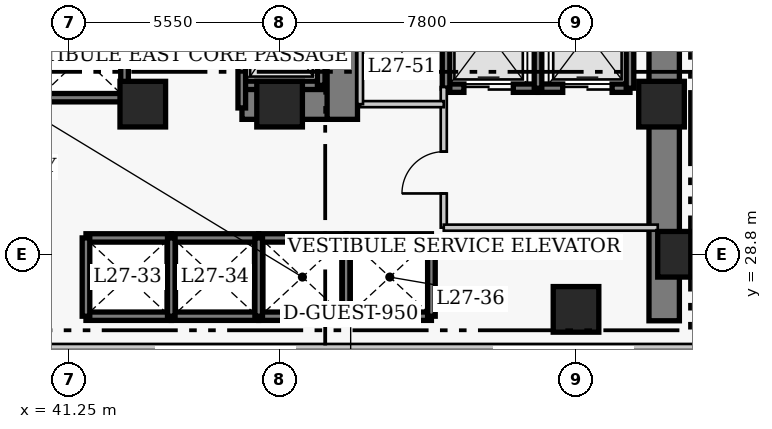
"""IFC4 building model, lengths in metres.
Left out: names, types, materials, properties, quantities, classifications, styles, units other than length and angle.
Written with IfcOpenShell. Run it as: python <this file> out.ifc"""

import sys

from ifc_helpers import new_model, si_unit, direction, frame, frame_2d, origin, origin_2d, place, context, subcontext, project, spatial, rectangle, extrude, element, fill, save


model = new_model("IFC4")
c1 = context("Model", 3, precision=1e-05, world=origin(), true_north=direction((0.0, 1.0)))
c2 = subcontext(c1, "Body", "Model", "MODEL_VIEW")
j1 = project(units=[si_unit("LENGTHUNIT", "METRE"), si_unit("PLANEANGLEUNIT", "RADIAN")], contexts=[c1])
p1 = place(None, origin())
s1 = spatial("IfcSite", under=j1, at=p1, CompositionType="ELEMENT")
p2 = place(p1, origin())
s2 = spatial("IfcBuilding", under=s1, at=p2, CompositionType="ELEMENT")
p3 = place(p2, frame((0.0, 0.0, 110.8)))
s3 = spatial("IfcBuildingStorey", under=s2, at=p3, CompositionType="ELEMENT", Elevation=110.8)
p4 = place(p3, frame((56.92, 27.05, 0.0), z_axis=(0.0, 0.0, 1.0), x_axis=(0.0, 1.0, 0.0)))
e1 = element("IfcWall", 1, at=p4, inside=s3, PredefinedType="SHEAR", context=c2, shape_type="SweptSolid", body=[
    extrude(rectangle(XDim=13.67, YDim=0.8, at=frame_2d((6.835, 0.0))), origin(), (0.0, 0.0, 1.0), 3.8),
])
p5 = place(p3, frame((45.81, 32.75, 0.0), z_axis=(0.0, 0.0, 1.0), x_axis=(1.0, 0.0, 0.0)))
e2 = element("IfcWall", 2, at=p5, inside=s3, PredefinedType="SHEAR", context=c2, shape_type="SweptSolid", body=[
    extrude(rectangle(XDim=2.64, YDim=0.8, at=frame_2d((1.32, 0.0))), origin(), (0.0, 0.0, 1.0), 3.8),
])
p6 = place(p3, frame((48.45, 32.35, 0.0), z_axis=(0.0, 0.0, 1.0), x_axis=(0.0, 1.0, 0.0)))
e3 = element("IfcWall", 3, at=p6, inside=s3, PredefinedType="SHEAR", context=c2, shape_type="SweptSolid", body=[
    extrude(rectangle(XDim=7.97, YDim=0.8, at=frame_2d((3.985, 0.0))), origin(), (0.0, 0.0, 1.0), 3.8),
])
p7 = place(p6, frame((5.85, 0.0, 0.0)))
e4 = element("IfcOpeningElement", 4, at=p7, cuts=e3, PredefinedType="OPENING", context=c2, shape_type="SweptSolid", body=[
    extrude(rectangle(XDim=1.1, YDim=2.15, at=frame_2d((0.55, 1.075))), frame((0.0, 0.41, 0.0), z_axis=(0.0, -1.0, 0.0), x_axis=(1.0, 0.0, 0.0)), (0.0, 0.0, 1.0), 0.82),
])
for number, where, z_axis, x_axis in (
    (5, (57.35, 28.8, 0.0), (0.0, 0.0, 1.0), (1.0, 0.0, 0.0)),
    (6, (43.2, 32.75, 0.0), (0.0, 0.0, 1.0), (1.0, 0.0, 0.0)),
    (7, (46.8, 32.75, 0.0), (0.0, 0.0, 1.0), (1.0, 0.0, 0.0)),
    (8, (54.6, 27.35, 0.0), (0.0, 0.0, 1.0), (1.0, 0.0, 0.0)),
    (9, (56.85, 32.75, 0.0), (0.0, 0.0, 1.0), (1.0, 0.0, 0.0)),
):
    element("IfcColumn", number, at=place(p3, frame(where, z_axis=z_axis, x_axis=x_axis)), inside=s3, PredefinedType="COLUMN", context=c2, shape_type="SweptSolid", body=[
        extrude(rectangle(XDim=1.2, YDim=1.2, at=origin_2d()), origin(), (0.0, 0.0, 1.0), 3.8),
    ])
for number, where, z_axis, x_axis in (
    (10, (41.705, 29.23, 0.0), (0.0, 0.0, 1.0), (1.0, 0.0, 0.0)),
    (11, (41.705, 27.17, 0.0), (0.0, 0.0, 1.0), (1.0, 0.0, 0.0)),
):
    element("IfcWall", number, at=place(p3, frame(where, z_axis=z_axis, x_axis=x_axis)), inside=s3, PredefinedType="SHEAR", context=c2, shape_type="SweptSolid", body=[
        extrude(rectangle(XDim=2.245, YDim=0.22, at=frame_2d((1.123, 0.0))), origin(), (0.0, 0.0, 1.0), 3.8),
    ])
p8 = place(p3, frame((41.705, 27.17, 0.0), z_axis=(0.0, 0.0, 1.0), x_axis=(0.0, 1.0, 0.0)))
e12 = element("IfcWall", 12, at=p8, inside=s3, PredefinedType="SHEAR", context=c2, shape_type="SweptSolid", body=[
    extrude(rectangle(XDim=2.06, YDim=0.2, at=frame_2d((1.03, 0.0))), origin(), (0.0, 0.0, 1.0), 3.8),
])
for number, where, z_axis, x_axis in (
    (13, (43.95, 29.23, 0.0), (0.0, 0.0, 1.0), (1.0, 0.0, 0.0)),
    (14, (43.95, 27.17, 0.0), (0.0, 0.0, 1.0), (1.0, 0.0, 0.0)),
):
    element("IfcWall", number, at=place(p3, frame(where, z_axis=z_axis, x_axis=x_axis)), inside=s3, PredefinedType="SHEAR", context=c2, shape_type="SweptSolid", body=[
        extrude(rectangle(XDim=2.3, YDim=0.22, at=frame_2d((1.15, 0.0))), origin(), (0.0, 0.0, 1.0), 3.8),
    ])
p9 = place(p3, frame((43.95, 27.17, 0.0), z_axis=(0.0, 0.0, 1.0), x_axis=(0.0, 1.0, 0.0)))
e15 = element("IfcWall", 15, at=p9, inside=s3, PredefinedType="SHEAR", context=c2, shape_type="SweptSolid", body=[
    extrude(rectangle(XDim=2.06, YDim=0.2, at=frame_2d((1.03, 0.0))), origin(), (0.0, 0.0, 1.0), 3.8),
])
for number, where, z_axis, x_axis in (
    (16, (46.25, 29.23, 0.0), (0.0, 0.0, 1.0), (1.0, 0.0, 0.0)),
    (17, (46.25, 27.17, 0.0), (0.0, 0.0, 1.0), (1.0, 0.0, 0.0)),
):
    element("IfcWall", number, at=place(p3, frame(where, z_axis=z_axis, x_axis=x_axis)), inside=s3, PredefinedType="SHEAR", context=c2, shape_type="SweptSolid", body=[
        extrude(rectangle(XDim=2.3, YDim=0.22, at=frame_2d((1.15, 0.0))), origin(), (0.0, 0.0, 1.0), 3.8),
    ])
p10 = place(p3, frame((46.25, 27.17, 0.0), z_axis=(0.0, 0.0, 1.0), x_axis=(0.0, 1.0, 0.0)))
e18 = element("IfcWall", 18, at=p10, inside=s3, PredefinedType="SHEAR", context=c2, shape_type="SweptSolid", body=[
    extrude(rectangle(XDim=2.06, YDim=0.2, at=frame_2d((1.03, 0.0))), origin(), (0.0, 0.0, 1.0), 3.8),
])
for number, where, z_axis, x_axis in (
    (19, (48.55, 29.23, 0.0), (0.0, 0.0, 1.0), (1.0, 0.0, 0.0)),
    (20, (48.55, 27.17, 0.0), (0.0, 0.0, 1.0), (1.0, 0.0, 0.0)),
):
    element("IfcWall", number, at=place(p3, frame(where, z_axis=z_axis, x_axis=x_axis)), inside=s3, PredefinedType="SHEAR", context=c2, shape_type="SweptSolid", body=[
        extrude(rectangle(XDim=2.245, YDim=0.22, at=frame_2d((1.123, 0.0))), origin(), (0.0, 0.0, 1.0), 3.8),
    ])
for number, where, z_axis, x_axis in (
    (21, (48.55, 27.17, 0.0), (0.0, 0.0, 1.0), (0.0, 1.0, 0.0)),
    (22, (50.795, 27.17, 0.0), (0.0, 0.0, 1.0), (0.0, 1.0, 0.0)),
):
    element("IfcWall", number, at=place(p3, frame(where, z_axis=z_axis, x_axis=x_axis)), inside=s3, PredefinedType="SHEAR", context=c2, shape_type="SweptSolid", body=[
        extrude(rectangle(XDim=2.06, YDim=0.2, at=frame_2d((1.03, 0.0))), origin(), (0.0, 0.0, 1.0), 3.8),
    ])
p11 = place(p3, frame((40.4, 32.92, 0.0), z_axis=(0.0, 0.0, 1.0), x_axis=(1.0, 0.0, 0.0)))
e23 = element("IfcWall", 23, at=p11, inside=s3, PredefinedType="SHEAR", context=c2, shape_type="SweptSolid", body=[
    extrude(rectangle(XDim=2.32, YDim=0.22, at=frame_2d((1.16, 0.0))), origin(), (0.0, 0.0, 1.0), 3.8),
])
p12 = place(p3, frame((42.72, 32.92, 0.0), z_axis=(0.0, 0.0, 1.0), x_axis=(0.0, 1.0, 0.0)))
e24 = element("IfcWall", 24, at=p12, inside=s3, PredefinedType="SHEAR", context=c2, shape_type="SweptSolid", body=[
    extrude(rectangle(XDim=2.16, YDim=0.2, at=frame_2d((1.08, 0.0))), origin(), (0.0, 0.0, 1.0), 3.8),
])
p13 = place(p3, frame((51.18, 33.17, 0.0), z_axis=(0.0, 0.0, 1.0), x_axis=(1.0, 0.0, 0.0)))
e25 = element("IfcWall", 25, at=p13, inside=s3, PredefinedType="SHEAR", context=c2, shape_type="SweptSolid", body=[
    extrude(rectangle(XDim=2.42, YDim=0.22, at=frame_2d((1.21, 0.0))), origin(), (0.0, 0.0, 1.0), 3.8),
])
p14 = place(p13, frame((0.47, 0.0, 0.0)))
e26 = element("IfcOpeningElement", 26, at=p14, cuts=e25, PredefinedType="OPENING", context=c2, shape_type="SweptSolid", body=[
    extrude(rectangle(XDim=1.3, YDim=2.15, at=frame_2d((0.65, 1.075))), frame((0.0, 0.12, 0.0), z_axis=(0.0, -1.0, 0.0), x_axis=(1.0, 0.0, 0.0)), (0.0, 0.0, 1.0), 0.24),
])
p15 = place(p3, frame((51.18, 33.17, 0.0), z_axis=(0.0, 0.0, 1.0), x_axis=(0.0, 1.0, 0.0)))
e27 = element("IfcWall", 27, at=p15, inside=s3, PredefinedType="SHEAR", context=c2, shape_type="SweptSolid", body=[
    extrude(rectangle(XDim=2.86, YDim=0.2, at=frame_2d((1.43, 0.0))), origin(), (0.0, 0.0, 1.0), 3.8),
])
p16 = place(p3, frame((53.6, 33.17, 0.0), z_axis=(0.0, 0.0, 1.0), x_axis=(1.0, 0.0, 0.0)))
e28 = element("IfcWall", 28, at=p16, inside=s3, PredefinedType="SHEAR", context=c2, shape_type="SweptSolid", body=[
    extrude(rectangle(XDim=2.42, YDim=0.22, at=frame_2d((1.21, 0.0))), origin(), (0.0, 0.0, 1.0), 3.8),
])
p17 = place(p16, frame((0.65, 0.0, 0.0)))
e29 = element("IfcOpeningElement", 29, at=p17, cuts=e28, PredefinedType="OPENING", context=c2, shape_type="SweptSolid", body=[
    extrude(rectangle(XDim=1.3, YDim=2.15, at=frame_2d((0.65, 1.075))), frame((0.0, 0.12, 0.0), z_axis=(0.0, -1.0, 0.0), x_axis=(1.0, 0.0, 0.0)), (0.0, 0.0, 1.0), 0.24),
])
for number, where, z_axis, x_axis in (
    (30, (53.6, 33.17, 0.0), (0.0, 0.0, 1.0), (0.0, 1.0, 0.0)),
    (31, (56.02, 33.17, 0.0), (0.0, 0.0, 1.0), (0.0, 1.0, 0.0)),
):
    element("IfcWall", number, at=place(p3, frame(where, z_axis=z_axis, x_axis=x_axis)), inside=s3, PredefinedType="SHEAR", context=c2, shape_type="SweptSolid", body=[
        extrude(rectangle(XDim=2.86, YDim=0.2, at=frame_2d((1.43, 0.0))), origin(), (0.0, 0.0, 1.0), 3.8),
    ])
p18 = place(p3, frame((45.805, 33.245, 0.0), z_axis=(0.0, 0.0, 1.0), x_axis=(1.0, 0.0, 0.0)))
e32 = element("IfcWall", 32, at=p18, inside=s3, PredefinedType="SHEAR", context=c2, shape_type="SweptSolid", body=[
    extrude(rectangle(XDim=2.09, YDim=0.22, at=frame_2d((1.045, 0.0))), origin(), (0.0, 0.0, 1.0), 3.8),
])
p19 = place(p3, frame((45.805, 32.65, 0.0), z_axis=(0.0, 0.0, 1.0), x_axis=(0.0, 1.0, 0.0)))
e33 = element("IfcWall", 33, at=p19, inside=s3, PredefinedType="SHEAR", context=c2, shape_type="SweptSolid", body=[
    extrude(rectangle(XDim=3.505, YDim=0.2, at=frame_2d((1.752, 0.0))), origin(), (0.0, 0.0, 1.0), 3.8),
])
p20 = place(p3, frame((47.895, 33.245, 0.0), z_axis=(0.0, 0.0, 1.0), x_axis=(0.0, 1.0, 0.0)))
e34 = element("IfcWall", 34, at=p20, inside=s3, PredefinedType="SHEAR", context=c2, shape_type="SweptSolid", body=[
    extrude(rectangle(XDim=2.91, YDim=0.2, at=frame_2d((1.455, 0.0))), origin(), (0.0, 0.0, 1.0), 3.8),
])
p21 = place(p3, frame((51.12, 29.5, 0.0), z_axis=(0.0, 0.0, 1.0), x_axis=(0.0, 1.0, 0.0)))
e35 = element("IfcWall", 35, at=p21, inside=s3, PredefinedType="PARTITIONING", context=c2, shape_type="SweptSolid", body=[
    extrude(rectangle(XDim=3.7, YDim=0.16, at=frame_2d((1.85, 0.0))), origin(), (0.0, 0.0, 1.0), 3.54),
])
p22 = place(p21, frame((0.9, 0.0, 0.0)))
e36 = element("IfcOpeningElement", 36, at=p22, cuts=e35, PredefinedType="OPENING", context=c2, shape_type="SweptSolid", body=[
    extrude(rectangle(XDim=1.1, YDim=2.15, at=frame_2d((0.55, 1.075))), frame((0.0, 0.09, 0.0), z_axis=(0.0, -1.0, 0.0), x_axis=(1.0, 0.0, 0.0)), (0.0, 0.0, 1.0), 0.18),
])
p23 = place(p3, frame((51.12, 29.5, 0.0), z_axis=(0.0, 0.0, 1.0), x_axis=(1.0, 0.0, 0.0)))
e37 = element("IfcWall", 37, at=p23, inside=s3, PredefinedType="PARTITIONING", context=c2, shape_type="SweptSolid", body=[
    extrude(rectangle(XDim=5.63, YDim=0.16, at=frame_2d((2.815, 0.0))), origin(), (0.0, 0.0, 1.0), 3.54),
])
p24 = place(p3, frame((48.92, 32.75, 0.0), z_axis=(0.0, 0.0, 1.0), x_axis=(1.0, 0.0, 0.0)))
e38 = element("IfcWall", 38, at=p24, inside=s3, PredefinedType="PARTITIONING", context=c2, shape_type="SweptSolid", body=[
    extrude(rectangle(XDim=2.2, YDim=0.16, at=frame_2d((1.1, 0.0))), origin(), (0.0, 0.0, 1.0), 3.54),
])
p25 = place(p3, frame((48.92, 32.75, 0.0), z_axis=(0.0, 0.0, 1.0), x_axis=(0.0, 1.0, 0.0)))
e39 = element("IfcWall", 39, at=p25, inside=s3, PredefinedType="PARTITIONING", context=c2, shape_type="SweptSolid", body=[
    extrude(rectangle(XDim=3.62, YDim=0.15, at=frame_2d((1.81, 0.0))), origin(), (0.0, 0.0, 1.0), 3.54),
])
p26 = place(p3, frame((35.85, 26.36, 0.0), z_axis=(0.0, 0.0, 1.0), x_axis=(1.0, 0.0, 0.0)))
e40 = element("IfcWall", 40, at=p26, inside=s3, PredefinedType="PARTITIONING", context=c2, shape_type="SweptSolid", body=[
    extrude(rectangle(XDim=22.45, YDim=0.16, at=frame_2d((11.225, 0.0))), origin(), (0.0, 0.0, 1.0), 3.54),
])
p27 = place(p14, origin())
e41 = element("IfcDoor", 41, at=p27, inside=s3, OperationType="DOUBLE_DOOR_SLIDING", PredefinedType="DOOR", context=c2, shape_type="SweptSolid", body=[
    extrude(rectangle(XDim=1.3, YDim=2.15, at=frame_2d((0.65, 1.075))), frame((0.0, 0.025, 0.0), z_axis=(0.0, -1.0, 0.0), x_axis=(1.0, 0.0, 0.0)), (0.0, 0.0, 1.0), 0.05),
])
fill(e26, e41)
p28 = place(p17, origin())
e42 = element("IfcDoor", 42, at=p28, inside=s3, OperationType="DOUBLE_DOOR_SLIDING", PredefinedType="DOOR", context=c2, shape_type="SweptSolid", body=[
    extrude(rectangle(XDim=1.3, YDim=2.15, at=frame_2d((0.65, 1.075))), frame((0.0, 0.025, 0.0), z_axis=(0.0, -1.0, 0.0), x_axis=(1.0, 0.0, 0.0)), (0.0, 0.0, 1.0), 0.05),
])
fill(e29, e42)
p29 = place(p22, origin())
e43 = element("IfcDoor", 43, at=p29, inside=s3, OperationType="SINGLE_SWING_LEFT", PredefinedType="DOOR", context=c2, shape_type="SweptSolid", body=[
    extrude(rectangle(XDim=1.1, YDim=2.15, at=frame_2d((0.55, 1.075))), frame((0.0, 0.025, 0.0), z_axis=(0.0, -1.0, 0.0), x_axis=(1.0, 0.0, 0.0)), (0.0, 0.0, 1.0), 0.05),
])
fill(e36, e43)
save(model, sys.argv[1])
